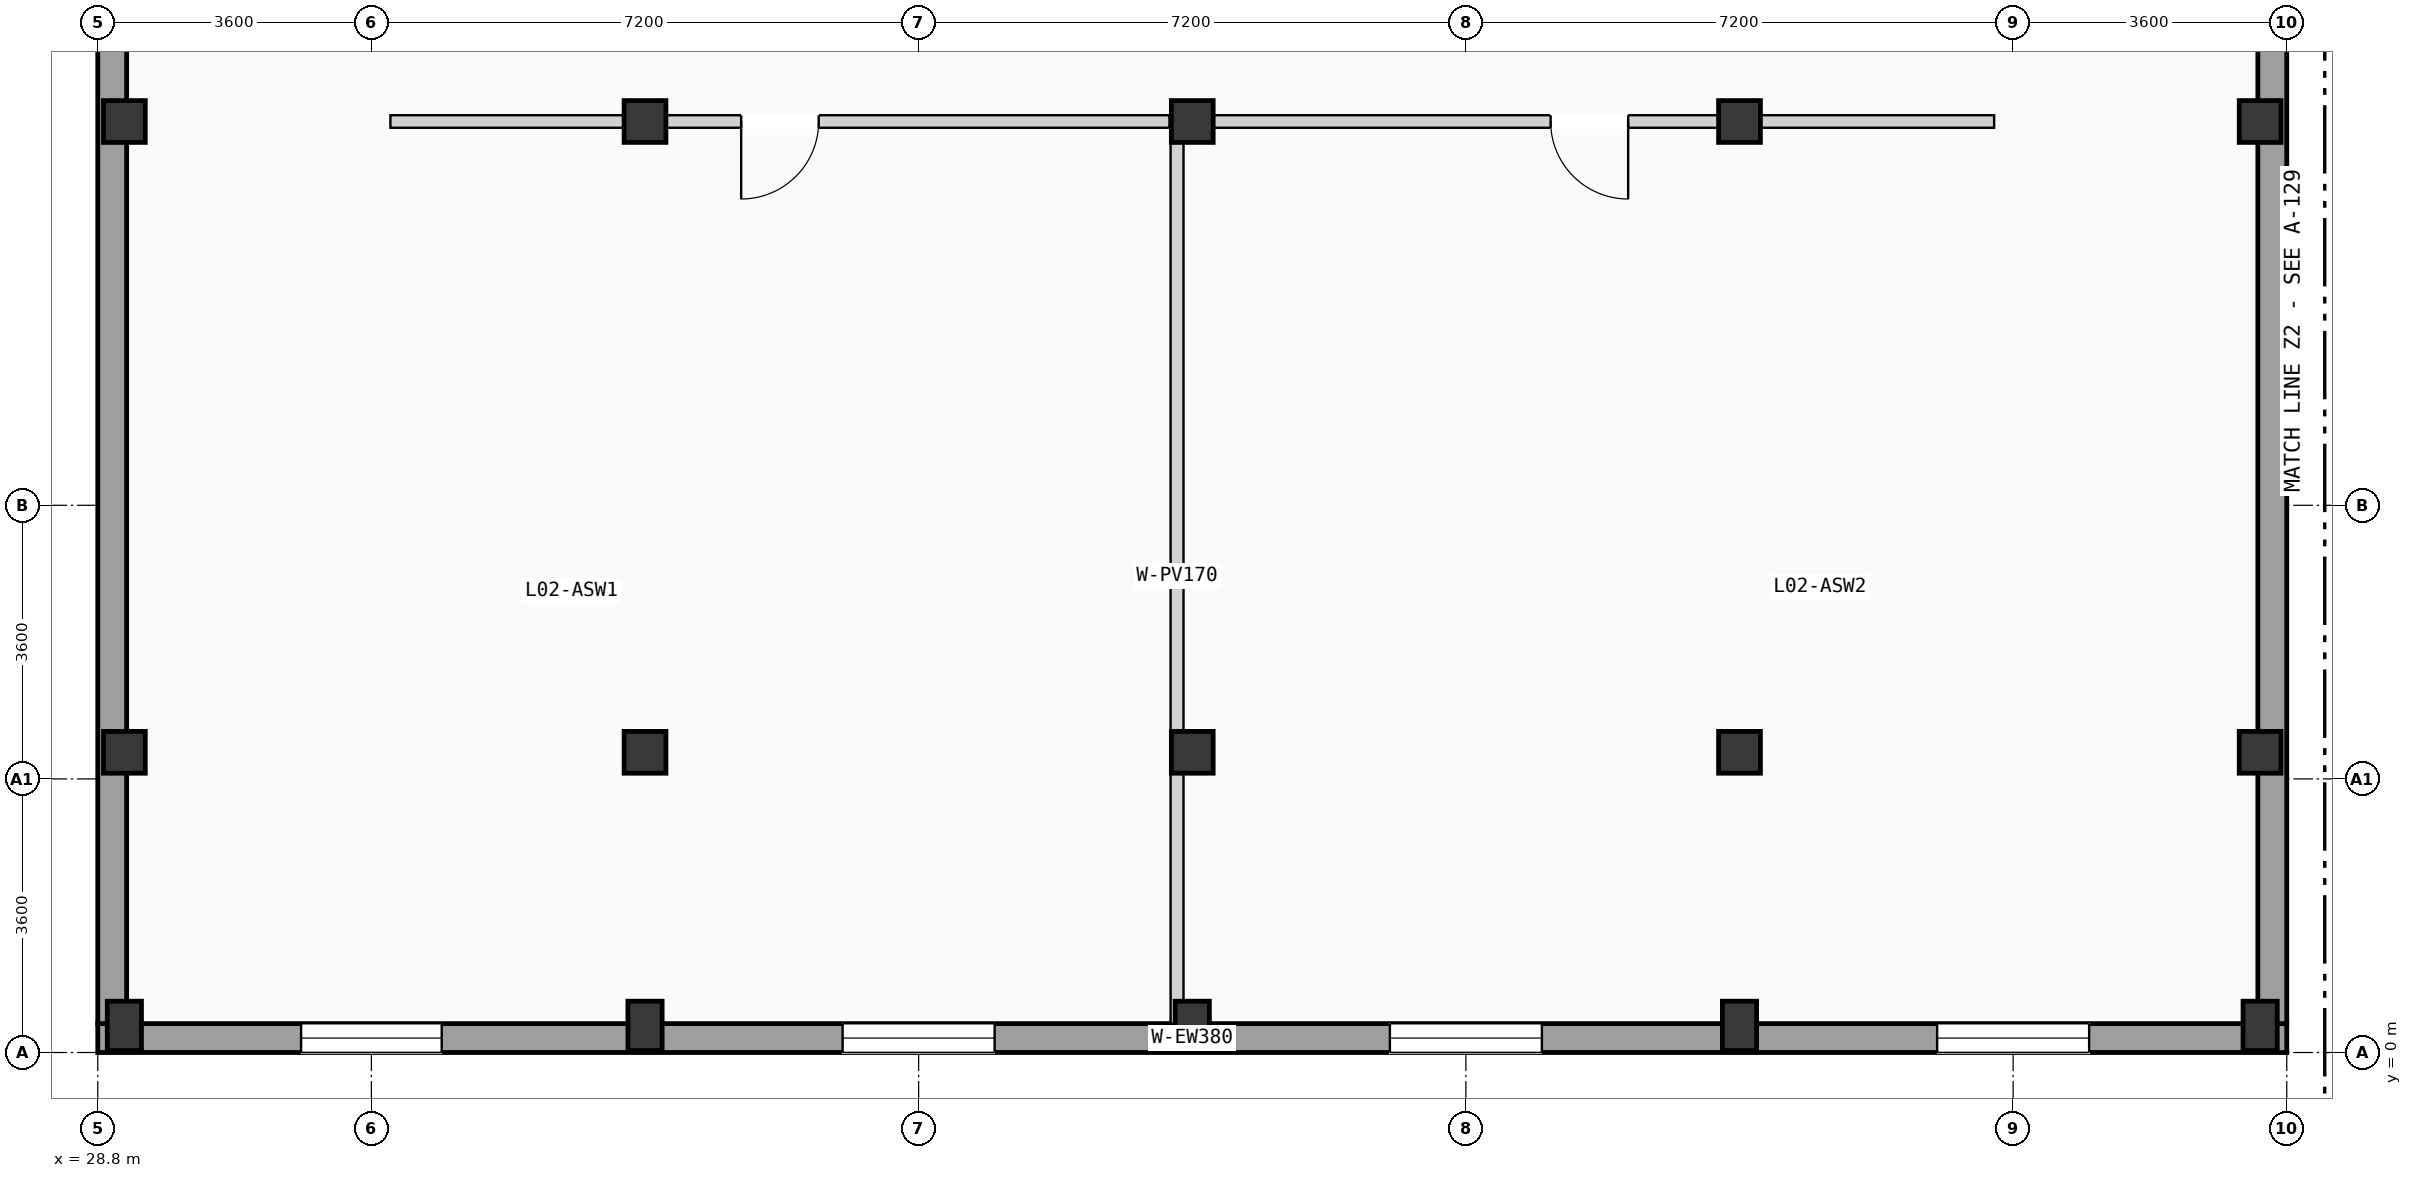
"""IFC4 building model, lengths in metres.
Left out: names, types, materials, properties, quantities, classifications, styles, units other than length and angle.
Written with IfcOpenShell. Run it as: python <this file> out.ifc"""

import sys

from ifc_helpers import new_model, si_unit, direction, frame, frame_2d, origin, origin_2d, place, context, subcontext, project, spatial, rectangle, extrude, element, fill, save


model = new_model("IFC4")
c1 = context("Model", 3, precision=1e-05, world=origin(), true_north=direction((0.0, 1.0)))
c2 = subcontext(c1, "Body", "Model", "MODEL_VIEW")
j1 = project(units=[si_unit("LENGTHUNIT", "METRE"), si_unit("PLANEANGLEUNIT", "RADIAN")], contexts=[c1])
p1 = place(None, origin())
s1 = spatial("IfcSite", under=j1, at=p1, CompositionType="ELEMENT")
p2 = place(p1, origin())
s2 = spatial("IfcBuilding", under=s1, at=p2, CompositionType="ELEMENT")
p3 = place(p2, frame((0.0, 0.0, 8.575)))
s3 = spatial("IfcBuildingStorey", under=s2, at=p3, CompositionType="ELEMENT", Elevation=8.575)
p4 = place(p3, frame((29.15, 0.35, 0.0), z_axis=(0.0, 0.0, 1.0), x_axis=(1.0, 0.0, 0.0)))
e1 = element("IfcColumn", 1, at=p4, inside=s3, PredefinedType="PILASTER", context=c2, shape_type="SweptSolid", body=[
    extrude(rectangle(XDim=0.45, YDim=0.65, at=origin_2d()), origin(), (0.0, 0.0, 1.0), 3.5),
])
for number, where, z_axis, x_axis in (
    (2, (29.15, 3.95, 0.0), (0.0, 0.0, 1.0), (1.0, 0.0, 0.0)),
    (3, (29.15, 12.25, 0.0), (0.0, 0.0, 1.0), (1.0, 0.0, 0.0)),
):
    element("IfcColumn", number, at=place(p3, frame(where, z_axis=z_axis, x_axis=x_axis)), inside=s3, PredefinedType="COLUMN", context=c2, shape_type="SweptSolid", body=[
        extrude(rectangle(XDim=0.55, YDim=0.55, at=origin_2d()), origin(), (0.0, 0.0, 1.0), 3.5),
    ])
p5 = place(p3, frame((36.0, 0.35, 0.0), z_axis=(0.0, 0.0, 1.0), x_axis=(1.0, 0.0, 0.0)))
e4 = element("IfcColumn", 4, at=p5, inside=s3, PredefinedType="PILASTER", context=c2, shape_type="SweptSolid", body=[
    extrude(rectangle(XDim=0.45, YDim=0.65, at=origin_2d()), origin(), (0.0, 0.0, 1.0), 3.5),
])
for number, where, z_axis, x_axis in (
    (5, (36.0, 3.95, 0.0), (0.0, 0.0, 1.0), (1.0, 0.0, 0.0)),
    (6, (36.0, 12.25, 0.0), (0.0, 0.0, 1.0), (1.0, 0.0, 0.0)),
):
    element("IfcColumn", number, at=place(p3, frame(where, z_axis=z_axis, x_axis=x_axis)), inside=s3, PredefinedType="COLUMN", context=c2, shape_type="SweptSolid", body=[
        extrude(rectangle(XDim=0.55, YDim=0.55, at=origin_2d()), origin(), (0.0, 0.0, 1.0), 3.5),
    ])
p6 = place(p3, frame((43.2, 0.35, 0.0), z_axis=(0.0, 0.0, 1.0), x_axis=(1.0, 0.0, 0.0)))
e7 = element("IfcColumn", 7, at=p6, inside=s3, PredefinedType="PILASTER", context=c2, shape_type="SweptSolid", body=[
    extrude(rectangle(XDim=0.45, YDim=0.65, at=origin_2d()), origin(), (0.0, 0.0, 1.0), 3.5),
])
for number, where, z_axis, x_axis in (
    (8, (43.2, 3.95, 0.0), (0.0, 0.0, 1.0), (1.0, 0.0, 0.0)),
    (9, (43.2, 12.25, 0.0), (0.0, 0.0, 1.0), (1.0, 0.0, 0.0)),
):
    element("IfcColumn", number, at=place(p3, frame(where, z_axis=z_axis, x_axis=x_axis)), inside=s3, PredefinedType="COLUMN", context=c2, shape_type="SweptSolid", body=[
        extrude(rectangle(XDim=0.55, YDim=0.55, at=origin_2d()), origin(), (0.0, 0.0, 1.0), 3.5),
    ])
p7 = place(p3, frame((50.4, 0.35, 0.0), z_axis=(0.0, 0.0, 1.0), x_axis=(1.0, 0.0, 0.0)))
e10 = element("IfcColumn", 10, at=p7, inside=s3, PredefinedType="PILASTER", context=c2, shape_type="SweptSolid", body=[
    extrude(rectangle(XDim=0.45, YDim=0.65, at=origin_2d()), origin(), (0.0, 0.0, 1.0), 3.5),
])
for number, where, z_axis, x_axis in (
    (11, (50.4, 3.95, 0.0), (0.0, 0.0, 1.0), (1.0, 0.0, 0.0)),
    (12, (50.4, 12.25, 0.0), (0.0, 0.0, 1.0), (1.0, 0.0, 0.0)),
):
    element("IfcColumn", number, at=place(p3, frame(where, z_axis=z_axis, x_axis=x_axis)), inside=s3, PredefinedType="COLUMN", context=c2, shape_type="SweptSolid", body=[
        extrude(rectangle(XDim=0.55, YDim=0.55, at=origin_2d()), origin(), (0.0, 0.0, 1.0), 3.5),
    ])
p8 = place(p3, frame((57.25, 0.35, 0.0), z_axis=(0.0, 0.0, 1.0), x_axis=(1.0, 0.0, 0.0)))
e13 = element("IfcColumn", 13, at=p8, inside=s3, PredefinedType="PILASTER", context=c2, shape_type="SweptSolid", body=[
    extrude(rectangle(XDim=0.45, YDim=0.65, at=origin_2d()), origin(), (0.0, 0.0, 1.0), 3.5),
])
for number, where, z_axis, x_axis in (
    (14, (57.25, 3.95, 0.0), (0.0, 0.0, 1.0), (1.0, 0.0, 0.0)),
    (15, (57.25, 12.25, 0.0), (0.0, 0.0, 1.0), (1.0, 0.0, 0.0)),
):
    element("IfcColumn", number, at=place(p3, frame(where, z_axis=z_axis, x_axis=x_axis)), inside=s3, PredefinedType="COLUMN", context=c2, shape_type="SweptSolid", body=[
        extrude(rectangle(XDim=0.55, YDim=0.55, at=origin_2d()), origin(), (0.0, 0.0, 1.0), 3.5),
    ])
p9 = place(p3, frame((28.8, 0.19, 0.0), z_axis=(0.0, 0.0, 1.0), x_axis=(1.0, 0.0, 0.0)))
e16 = element("IfcWall", 16, at=p9, inside=s3, PredefinedType="SOLIDWALL", context=c2, shape_type="SweptSolid", body=[
    extrude(rectangle(XDim=28.8, YDim=0.38, at=frame_2d((14.4, 0.0))), origin(), (0.0, 0.0, 1.0), 3.26),
])
p10 = place(p9, frame((2.675, 0.0, 0.85)))
e17 = element("IfcOpeningElement", 17, at=p10, cuts=e16, PredefinedType="OPENING", context=c2, shape_type="SweptSolid", body=[
    extrude(rectangle(XDim=1.85, YDim=1.35, at=frame_2d((0.925, 0.675))), frame((0.0, 0.2, 0.0), z_axis=(0.0, -1.0, 0.0), x_axis=(1.0, 0.0, 0.0)), (0.0, 0.0, 1.0), 0.4),
])
p11 = place(p9, frame((9.8, 0.0, 0.85)))
e18 = element("IfcOpeningElement", 18, at=p11, cuts=e16, PredefinedType="OPENING", context=c2, shape_type="SweptSolid", body=[
    extrude(rectangle(XDim=2.0, YDim=1.2, at=frame_2d((1.0, 0.6))), frame((0.0, 0.2, 0.0), z_axis=(0.0, -1.0, 0.0), x_axis=(1.0, 0.0, 0.0)), (0.0, 0.0, 1.0), 0.4),
])
p12 = place(p9, frame((17.0, 0.0, 0.85)))
e19 = element("IfcOpeningElement", 19, at=p12, cuts=e16, PredefinedType="OPENING", context=c2, shape_type="SweptSolid", body=[
    extrude(rectangle(XDim=2.0, YDim=1.35, at=frame_2d((1.0, 0.675))), frame((0.0, 0.2, 0.0), z_axis=(0.0, -1.0, 0.0), x_axis=(1.0, 0.0, 0.0)), (0.0, 0.0, 1.0), 0.4),
])
p13 = place(p9, frame((24.2, 0.0, 0.85)))
e20 = element("IfcOpeningElement", 20, at=p13, cuts=e16, PredefinedType="OPENING", context=c2, shape_type="SweptSolid", body=[
    extrude(rectangle(XDim=2.0, YDim=1.5, at=frame_2d((1.0, 0.75))), frame((0.0, 0.2, 0.0), z_axis=(0.0, -1.0, 0.0), x_axis=(1.0, 0.0, 0.0)), (0.0, 0.0, 1.0), 0.4),
])
for number, where, z_axis, x_axis in (
    (21, (28.99, 0.38, 0.0), (0.0, 0.0, 1.0), (0.0, 1.0, 0.0)),
    (22, (57.41, 0.38, 0.0), (0.0, 0.0, 1.0), (0.0, 1.0, 0.0)),
):
    element("IfcWall", number, at=place(p3, frame(where, z_axis=z_axis, x_axis=x_axis)), inside=s3, PredefinedType="SOLIDWALL", context=c2, shape_type="SweptSolid", body=[
        extrude(rectangle(XDim=20.84, YDim=0.38, at=frame_2d((10.42, 0.0))), origin(), (0.0, 0.0, 1.0), 3.26),
    ])
p14 = place(p3, frame((32.65, 12.25, 0.0), z_axis=(0.0, 0.0, 1.0), x_axis=(1.0, 0.0, 0.0)))
e23 = element("IfcWall", 23, at=p14, inside=s3, PredefinedType="PARTITIONING", context=c2, shape_type="SweptSolid", body=[
    extrude(rectangle(XDim=10.25, YDim=0.165, at=frame_2d((5.125, 0.0))), origin(), (0.0, 0.0, 1.0), 2.58),
])
p15 = place(p14, frame((4.615, 0.0, 0.0)))
e24 = element("IfcOpeningElement", 24, at=p15, cuts=e23, PredefinedType="OPENING", context=c2, shape_type="SweptSolid", body=[
    extrude(rectangle(XDim=1.02, YDim=2.16, at=frame_2d((0.51, 1.08))), frame((0.0, 0.093, 0.0), z_axis=(0.0, -1.0, 0.0), x_axis=(1.0, 0.0, 0.0)), (0.0, 0.0, 1.0), 0.185),
])
p16 = place(p3, frame((43.1, 12.25, 0.0), z_axis=(0.0, 0.0, 1.0), x_axis=(1.0, 0.0, 0.0)))
e25 = element("IfcWall", 25, at=p16, inside=s3, PredefinedType="PARTITIONING", context=c2, shape_type="SweptSolid", body=[
    extrude(rectangle(XDim=10.65, YDim=0.165, at=frame_2d((5.325, 0.0))), origin(), (0.0, 0.0, 1.0), 2.58),
])
p17 = place(p16, frame((4.815, 0.0, 0.0)))
e26 = element("IfcOpeningElement", 26, at=p17, cuts=e25, PredefinedType="OPENING", context=c2, shape_type="SweptSolid", body=[
    extrude(rectangle(XDim=1.02, YDim=2.16, at=frame_2d((0.51, 1.08))), frame((0.0, 0.093, 0.0), z_axis=(0.0, -1.0, 0.0), x_axis=(1.0, 0.0, 0.0)), (0.0, 0.0, 1.0), 0.185),
])
p18 = place(p3, frame((43.0, 0.38, 0.0), z_axis=(0.0, 0.0, 1.0), x_axis=(0.0, 1.0, 0.0)))
e27 = element("IfcWall", 27, at=p18, inside=s3, PredefinedType="PARTITIONING", context=c2, shape_type="SweptSolid", body=[
    extrude(rectangle(XDim=11.788, YDim=0.17, at=frame_2d((5.894, 0.0))), origin(), (0.0, 0.0, 1.0), 2.63),
])
p19 = place(p10, origin())
e28 = element("IfcWindow", 28, at=p19, inside=s3, PartitioningType="DOUBLE_PANEL_VERTICAL", PredefinedType="WINDOW", context=c2, shape_type="SweptSolid", body=[
    extrude(rectangle(XDim=1.85, YDim=1.35, at=frame_2d((0.925, 0.675))), frame((0.0, 0.03, 0.0), z_axis=(0.0, -1.0, 0.0), x_axis=(1.0, 0.0, 0.0)), (0.0, 0.0, 1.0), 0.06),
])
fill(e17, e28)
p20 = place(p11, origin())
e29 = element("IfcWindow", 29, at=p20, inside=s3, PartitioningType="DOUBLE_PANEL_VERTICAL", PredefinedType="WINDOW", context=c2, shape_type="SweptSolid", body=[
    extrude(rectangle(XDim=2.0, YDim=1.2, at=frame_2d((1.0, 0.6))), frame((0.0, 0.03, 0.0), z_axis=(0.0, -1.0, 0.0), x_axis=(1.0, 0.0, 0.0)), (0.0, 0.0, 1.0), 0.06),
])
fill(e18, e29)
p21 = place(p12, origin())
e30 = element("IfcWindow", 30, at=p21, inside=s3, PartitioningType="DOUBLE_PANEL_VERTICAL", PredefinedType="WINDOW", context=c2, shape_type="SweptSolid", body=[
    extrude(rectangle(XDim=2.0, YDim=1.35, at=frame_2d((1.0, 0.675))), frame((0.0, 0.03, 0.0), z_axis=(0.0, -1.0, 0.0), x_axis=(1.0, 0.0, 0.0)), (0.0, 0.0, 1.0), 0.06),
])
fill(e19, e30)
p22 = place(p13, origin())
e31 = element("IfcWindow", 31, at=p22, inside=s3, PartitioningType="DOUBLE_PANEL_VERTICAL", PredefinedType="WINDOW", context=c2, shape_type="SweptSolid", body=[
    extrude(rectangle(XDim=2.0, YDim=1.5, at=frame_2d((1.0, 0.75))), frame((0.0, 0.03, 0.0), z_axis=(0.0, -1.0, 0.0), x_axis=(1.0, 0.0, 0.0)), (0.0, 0.0, 1.0), 0.06),
])
fill(e20, e31)
p23 = place(p15, frame((1.02, 0.0, 0.0), z_axis=(0.0, 0.0, 1.0), x_axis=(-1.0, 0.0, 0.0)))
e32 = element("IfcDoor", 32, at=p23, inside=s3, OperationType="SINGLE_SWING_LEFT", PredefinedType="DOOR", context=c2, shape_type="SweptSolid", body=[
    extrude(rectangle(XDim=1.02, YDim=2.16, at=frame_2d((0.51, 1.08))), frame((0.0, 0.025, 0.0), z_axis=(0.0, -1.0, 0.0), x_axis=(1.0, 0.0, 0.0)), (0.0, 0.0, 1.0), 0.05),
])
fill(e24, e32)
p24 = place(p17, frame((1.02, 0.0, 0.0), z_axis=(0.0, 0.0, 1.0), x_axis=(-1.0, 0.0, 0.0)))
e33 = element("IfcDoor", 33, at=p24, inside=s3, OperationType="SINGLE_SWING_RIGHT", PredefinedType="DOOR", context=c2, shape_type="SweptSolid", body=[
    extrude(rectangle(XDim=1.02, YDim=2.16, at=frame_2d((0.51, 1.08))), frame((0.0, 0.025, 0.0), z_axis=(0.0, -1.0, 0.0), x_axis=(1.0, 0.0, 0.0)), (0.0, 0.0, 1.0), 0.05),
])
fill(e26, e33)
save(model, sys.argv[1])
